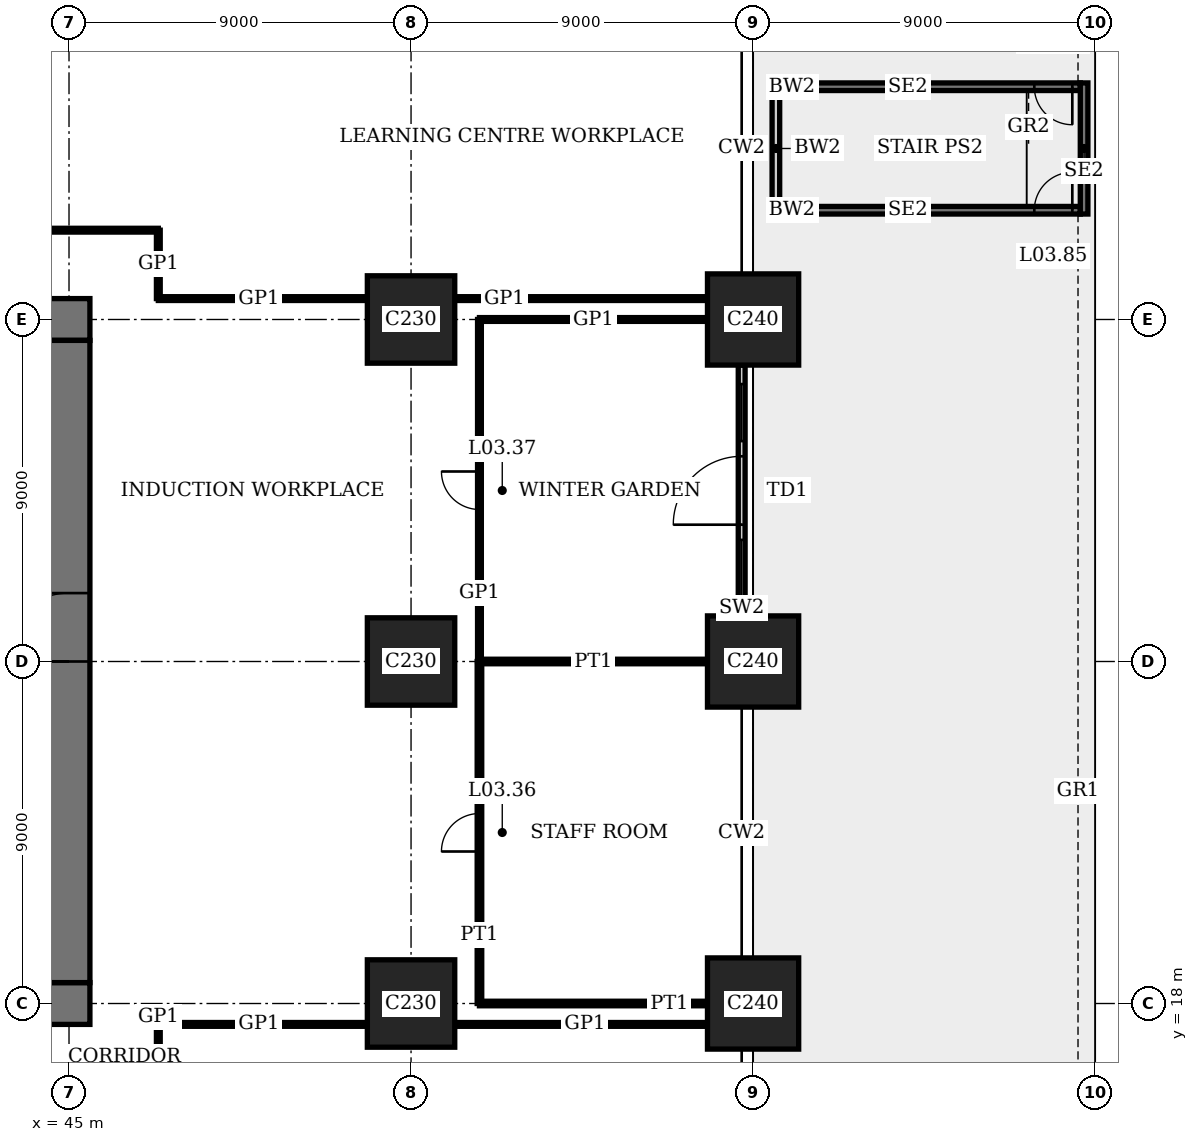
"""IFC4 building model, lengths in metres.
Left out: names, types, materials, properties, quantities, classifications, styles, units other than length and angle.
Written with IfcOpenShell. Run it as: python <this file> out.ifc"""

import sys

from ifc_helpers import new_model, si_unit, direction, frame, frame_2d, origin, origin_2d, place, context, subcontext, project, spatial, rectangle, extrude, element, fill, save


model = new_model("IFC4")
c1 = context("Model", 3, precision=1e-05, world=origin(), true_north=direction((0.0, 1.0)))
c2 = subcontext(c1, "Body", "Model", "MODEL_VIEW")
j1 = project(units=[si_unit("LENGTHUNIT", "METRE"), si_unit("PLANEANGLEUNIT", "RADIAN")], contexts=[c1])
p1 = place(None, origin())
s1 = spatial("IfcSite", under=j1, at=p1, CompositionType="ELEMENT")
p2 = place(p1, origin())
s2 = spatial("IfcBuilding", under=s1, at=p2, CompositionType="ELEMENT")
p3 = place(p2, frame((0.0, 0.0, 15.8)))
s3 = spatial("IfcBuildingStorey", under=s2, at=p3, CompositionType="ELEMENT", Elevation=15.8)
for number, where, z_axis, x_axis in (
    (1, (54.0, 18.0, 0.0), (0.0, 0.0, 1.0), (1.0, 0.0, 0.0)),
    (2, (54.0, 27.0, 0.0), (0.0, 0.0, 1.0), (1.0, 0.0, 0.0)),
    (3, (54.0, 36.0, 0.0), (0.0, 0.0, 1.0), (1.0, 0.0, 0.0)),
):
    element("IfcColumn", number, at=place(p3, frame(where, z_axis=z_axis, x_axis=x_axis)), inside=s3, PredefinedType="COLUMN", context=c2, shape_type="SweptSolid", body=[
        extrude(rectangle(XDim=2.3, YDim=2.3, at=origin_2d()), origin(), (0.0, 0.0, 1.0), 4.0),
    ])
for number, where, z_axis, x_axis in (
    (4, (63.0, 18.0, 0.0), (0.0, 0.0, 1.0), (1.0, 0.0, 0.0)),
    (5, (63.0, 27.0, 0.0), (0.0, 0.0, 1.0), (1.0, 0.0, 0.0)),
    (6, (63.0, 36.0, 0.0), (0.0, 0.0, 1.0), (1.0, 0.0, 0.0)),
):
    element("IfcColumn", number, at=place(p3, frame(where, z_axis=z_axis, x_axis=x_axis)), inside=s3, PredefinedType="COLUMN", context=c2, shape_type="SweptSolid", body=[
        extrude(rectangle(XDim=2.4, YDim=2.4, at=origin_2d()), origin(), (0.0, 0.0, 1.0), 4.0),
    ])
p4 = place(p3, frame((17.45, 18.0, 0.0), z_axis=(0.0, 0.0, 1.0), x_axis=(1.0, 0.0, 0.0)))
e7 = element("IfcWall", 7, at=p4, inside=s3, PredefinedType="SHEAR", context=c2, shape_type="SweptSolid", body=[
    extrude(rectangle(XDim=28.1, YDim=1.1, at=frame_2d((14.05, 0.0))), origin(), (0.0, 0.0, 1.0), 4.0),
])
p5 = place(p4, frame((11.55, 0.0, 0.0)))
e8 = element("IfcOpeningElement", 8, at=p5, cuts=e7, PredefinedType="OPENING", context=c2, shape_type="SweptSolid", body=[
    extrude(rectangle(XDim=1.0, YDim=2.4, at=frame_2d((0.5, 1.2))), frame((0.0, 0.56, 0.0), z_axis=(0.0, -1.0, 0.0), x_axis=(1.0, 0.0, 0.0)), (0.0, 0.0, 1.0), 1.12),
])
p6 = place(p4, frame((16.55, 0.0, 0.0)))
e9 = element("IfcOpeningElement", 9, at=p6, cuts=e7, PredefinedType="OPENING", context=c2, shape_type="SweptSolid", body=[
    extrude(rectangle(XDim=1.0, YDim=2.4, at=frame_2d((0.5, 1.2))), frame((0.0, 0.56, 0.0), z_axis=(0.0, -1.0, 0.0), x_axis=(1.0, 0.0, 0.0)), (0.0, 0.0, 1.0), 1.12),
])
p7 = place(p4, frame((20.0, 0.0, 0.0)))
e10 = element("IfcOpeningElement", 10, at=p7, cuts=e7, PredefinedType="OPENING", context=c2, shape_type="SweptSolid", body=[
    extrude(rectangle(XDim=1.1, YDim=2.4, at=frame_2d((0.55, 1.2))), frame((0.0, 0.56, 0.0), z_axis=(0.0, -1.0, 0.0), x_axis=(1.0, 0.0, 0.0)), (0.0, 0.0, 1.0), 1.12),
])
p8 = place(p4, frame((24.05, 0.0, 0.0)))
e11 = element("IfcOpeningElement", 11, at=p8, cuts=e7, PredefinedType="OPENING", context=c2, shape_type="SweptSolid", body=[
    extrude(rectangle(XDim=1.0, YDim=2.4, at=frame_2d((0.5, 1.2))), frame((0.0, 0.56, 0.0), z_axis=(0.0, -1.0, 0.0), x_axis=(1.0, 0.0, 0.0)), (0.0, 0.0, 1.0), 1.12),
])
p9 = place(p3, frame((45.55, 36.0, 0.0), z_axis=(0.0, 0.0, 1.0), x_axis=(-1.0, 0.0, 0.0)))
e12 = element("IfcWall", 12, at=p9, inside=s3, PredefinedType="SHEAR", context=c2, shape_type="SweptSolid", body=[
    extrude(rectangle(XDim=28.1, YDim=1.1, at=frame_2d((14.05, 0.0))), origin(), (0.0, 0.0, 1.0), 4.0),
])
p10 = place(p9, frame((11.55, 0.0, 0.0)))
e13 = element("IfcOpeningElement", 13, at=p10, cuts=e12, PredefinedType="OPENING", context=c2, shape_type="SweptSolid", body=[
    extrude(rectangle(XDim=1.0, YDim=2.4, at=frame_2d((0.5, 1.2))), frame((0.0, 0.56, 0.0), z_axis=(0.0, -1.0, 0.0), x_axis=(1.0, 0.0, 0.0)), (0.0, 0.0, 1.0), 1.12),
])
p11 = place(p9, frame((16.55, 0.0, 0.0)))
e14 = element("IfcOpeningElement", 14, at=p11, cuts=e12, PredefinedType="OPENING", context=c2, shape_type="SweptSolid", body=[
    extrude(rectangle(XDim=1.0, YDim=2.4, at=frame_2d((0.5, 1.2))), frame((0.0, 0.56, 0.0), z_axis=(0.0, -1.0, 0.0), x_axis=(1.0, 0.0, 0.0)), (0.0, 0.0, 1.0), 1.12),
])
p12 = place(p9, frame((20.0, 0.0, 0.0)))
e15 = element("IfcOpeningElement", 15, at=p12, cuts=e12, PredefinedType="OPENING", context=c2, shape_type="SweptSolid", body=[
    extrude(rectangle(XDim=1.1, YDim=2.4, at=frame_2d((0.55, 1.2))), frame((0.0, 0.56, 0.0), z_axis=(0.0, -1.0, 0.0), x_axis=(1.0, 0.0, 0.0)), (0.0, 0.0, 1.0), 1.12),
])
p13 = place(p9, frame((24.05, 0.0, 0.0)))
e16 = element("IfcOpeningElement", 16, at=p13, cuts=e12, PredefinedType="OPENING", context=c2, shape_type="SweptSolid", body=[
    extrude(rectangle(XDim=1.0, YDim=2.4, at=frame_2d((0.5, 1.2))), frame((0.0, 0.56, 0.0), z_axis=(0.0, -1.0, 0.0), x_axis=(1.0, 0.0, 0.0)), (0.0, 0.0, 1.0), 1.12),
])
p14 = place(p3, frame((45.0, 18.55, 0.0), z_axis=(0.0, 0.0, 1.0), x_axis=(0.0, 1.0, 0.0)))
e17 = element("IfcWall", 17, at=p14, inside=s3, PredefinedType="SHEAR", context=c2, shape_type="SweptSolid", body=[
    extrude(rectangle(XDim=16.9, YDim=1.1, at=frame_2d((8.45, 0.0))), origin(), (0.0, 0.0, 1.0), 4.0),
])
p15 = place(p14, frame((8.45, 0.0, 0.0)))
e18 = element("IfcOpeningElement", 18, at=p15, cuts=e17, PredefinedType="OPENING", context=c2, shape_type="SweptSolid", body=[
    extrude(rectangle(XDim=1.8, YDim=2.4, at=frame_2d((0.9, 1.2))), frame((0.0, 0.56, 0.0), z_axis=(0.0, -1.0, 0.0), x_axis=(1.0, 0.0, 0.0)), (0.0, 0.0, 1.0), 1.12),
])
p16 = place(p3, frame((62.7, 28.2, 0.0), z_axis=(0.0, 0.0, 1.0), x_axis=(0.0, 1.0, 0.0)))
e19 = element("IfcWall", 19, at=p16, inside=s3, PredefinedType="SOLIDWALL", context=c2, shape_type="SweptSolid", body=[
    extrude(rectangle(XDim=6.6, YDim=0.18, at=frame_2d((3.3, 0.0))), origin(), (0.0, 0.0, 1.0), 2.95),
])
p17 = place(p16, frame((2.4, 0.0, 0.0)))
e20 = element("IfcOpeningElement", 20, at=p17, cuts=e19, PredefinedType="OPENING", context=c2, shape_type="SweptSolid", body=[
    extrude(rectangle(XDim=1.8, YDim=2.7, at=frame_2d((0.9, 1.35))), frame((0.0, 0.1, 0.0), z_axis=(0.0, -1.0, 0.0), x_axis=(1.0, 0.0, 0.0)), (0.0, 0.0, 1.0), 0.2),
])
p18 = place(p16, frame((0.5, 0.0, 0.3)))
e21 = element("IfcOpeningElement", 21, at=p18, cuts=e19, PredefinedType="OPENING", context=c2, shape_type="SweptSolid", body=[
    extrude(rectangle(XDim=1.5, YDim=2.4, at=frame_2d((0.75, 1.2))), frame((0.0, 0.1, 0.0), z_axis=(0.0, -1.0, 0.0), x_axis=(1.0, 0.0, 0.0)), (0.0, 0.0, 1.0), 0.2),
])
p19 = place(p16, frame((4.6, 0.0, 0.3)))
e22 = element("IfcOpeningElement", 22, at=p19, cuts=e19, PredefinedType="OPENING", context=c2, shape_type="SweptSolid", body=[
    extrude(rectangle(XDim=1.5, YDim=2.4, at=frame_2d((0.75, 1.2))), frame((0.0, 0.1, 0.0), z_axis=(0.0, -1.0, 0.0), x_axis=(1.0, 0.0, 0.0)), (0.0, 0.0, 1.0), 0.2),
])
p20 = place(p3, frame((47.35, 17.45, 0.0), z_axis=(0.0, 0.0, 1.0), x_axis=(1.0, 0.0, 0.0)))
e23 = element("IfcWall", 23, at=p20, inside=s3, PredefinedType="PARTITIONING", context=c2, shape_type="SweptSolid", body=[
    extrude(rectangle(XDim=5.5, YDim=0.1, at=frame_2d((2.75, 0.0))), origin(), (0.0, 0.0, 1.0), 3.75),
])
p21 = place(p3, frame((55.15, 17.45, 0.0), z_axis=(0.0, 0.0, 1.0), x_axis=(1.0, 0.0, 0.0)))
e24 = element("IfcWall", 24, at=p21, inside=s3, PredefinedType="PARTITIONING", context=c2, shape_type="SweptSolid", body=[
    extrude(rectangle(XDim=6.65, YDim=0.1, at=frame_2d((3.325, 0.0))), origin(), (0.0, 0.0, 1.0), 3.75),
])
for number, where, z_axis, x_axis in (
    (25, (55.8, 18.0, 0.0), (0.0, 0.0, 1.0), (1.0, 0.0, 0.0)),
    (26, (55.8, 27.0, 0.0), (0.0, 0.0, 1.0), (1.0, 0.0, 0.0)),
):
    element("IfcWall", number, at=place(p3, frame(where, z_axis=z_axis, x_axis=x_axis)), inside=s3, PredefinedType="PARTITIONING", context=c2, shape_type="SweptSolid", body=[
        extrude(rectangle(XDim=6.0, YDim=0.12, at=frame_2d((3.0, 0.0))), origin(), (0.0, 0.0, 1.0), 3.05),
    ])
p22 = place(p3, frame((55.8, 36.0, 0.0), z_axis=(0.0, 0.0, 1.0), x_axis=(1.0, 0.0, 0.0)))
e27 = element("IfcWall", 27, at=p22, inside=s3, PredefinedType="PARTITIONING", context=c2, shape_type="SweptSolid", body=[
    extrude(rectangle(XDim=6.0, YDim=0.1, at=frame_2d((3.0, 0.0))), origin(), (0.0, 0.0, 1.0), 3.05),
])
p23 = place(p3, frame((47.35, 36.55, 0.0), z_axis=(0.0, 0.0, 1.0), x_axis=(1.0, 0.0, 0.0)))
e28 = element("IfcWall", 28, at=p23, inside=s3, PredefinedType="PARTITIONING", context=c2, shape_type="SweptSolid", body=[
    extrude(rectangle(XDim=5.5, YDim=0.1, at=frame_2d((2.75, 0.0))), origin(), (0.0, 0.0, 1.0), 3.75),
])
p24 = place(p3, frame((55.15, 36.55, 0.0), z_axis=(0.0, 0.0, 1.0), x_axis=(1.0, 0.0, 0.0)))
e29 = element("IfcWall", 29, at=p24, inside=s3, PredefinedType="PARTITIONING", context=c2, shape_type="SweptSolid", body=[
    extrude(rectangle(XDim=6.65, YDim=0.1, at=frame_2d((3.325, 0.0))), origin(), (0.0, 0.0, 1.0), 3.75),
])
p25 = place(p3, frame((36.0, 38.35, 0.0), z_axis=(0.0, 0.0, 1.0), x_axis=(1.0, 0.0, 0.0)))
e30 = element("IfcWall", 30, at=p25, inside=s3, PredefinedType="PARTITIONING", context=c2, shape_type="SweptSolid", body=[
    extrude(rectangle(XDim=11.35, YDim=0.1, at=frame_2d((5.675, 0.0))), origin(), (0.0, 0.0, 1.0), 3.75),
])
for number, where, z_axis, x_axis in (
    (31, (47.35, 15.65, 0.0), (0.0, 0.0, 1.0), (0.0, 1.0, 0.0)),
    (32, (47.35, 36.55, 0.0), (0.0, 0.0, 1.0), (0.0, 1.0, 0.0)),
):
    element("IfcWall", number, at=place(p3, frame(where, z_axis=z_axis, x_axis=x_axis)), inside=s3, PredefinedType="PARTITIONING", context=c2, shape_type="SweptSolid", body=[
        extrude(rectangle(XDim=1.8, YDim=0.1, at=frame_2d((0.9, 0.0))), origin(), (0.0, 0.0, 1.0), 3.75),
    ])
p26 = place(p3, frame((55.8, 18.0, 0.0), z_axis=(0.0, 0.0, 1.0), x_axis=(0.0, 1.0, 0.0)))
e33 = element("IfcWall", 33, at=p26, inside=s3, PredefinedType="PARTITIONING", context=c2, shape_type="SweptSolid", body=[
    extrude(rectangle(XDim=9.0, YDim=0.12, at=frame_2d((4.5, 0.0))), origin(), (0.0, 0.0, 1.0), 3.75),
])
p27 = place(p26, frame((4.0, 0.0, 0.0)))
e34 = element("IfcOpeningElement", 34, at=p27, cuts=e33, PredefinedType="OPENING", context=c2, shape_type="SweptSolid", body=[
    extrude(rectangle(XDim=1.0, YDim=2.4, at=frame_2d((0.5, 1.2))), frame((0.0, 0.07, 0.0), z_axis=(0.0, -1.0, 0.0), x_axis=(1.0, 0.0, 0.0)), (0.0, 0.0, 1.0), 0.14),
])
p28 = place(p3, frame((55.8, 27.0, 0.0), z_axis=(0.0, 0.0, 1.0), x_axis=(0.0, 1.0, 0.0)))
e35 = element("IfcWall", 35, at=p28, inside=s3, PredefinedType="PARTITIONING", context=c2, shape_type="SweptSolid", body=[
    extrude(rectangle(XDim=9.0, YDim=0.1, at=frame_2d((4.5, 0.0))), origin(), (0.0, 0.0, 1.0), 3.75),
])
p29 = place(p28, frame((4.0, 0.0, 0.0)))
e36 = element("IfcOpeningElement", 36, at=p29, cuts=e35, PredefinedType="OPENING", context=c2, shape_type="SweptSolid", body=[
    extrude(rectangle(XDim=1.0, YDim=2.4, at=frame_2d((0.5, 1.2))), frame((0.0, 0.06, 0.0), z_axis=(0.0, -1.0, 0.0), x_axis=(1.0, 0.0, 0.0)), (0.0, 0.0, 1.0), 0.12),
])
p30 = place(p3, frame((71.61, 42.125, 0.0), z_axis=(0.0, 0.0, 1.0), x_axis=(-1.0, 0.0, 0.0)))
e37 = element("IfcWall", 37, at=p30, inside=s3, PredefinedType="SOLIDWALL", context=c2, shape_type="SweptSolid", body=[
    extrude(rectangle(XDim=7.26, YDim=0.2, at=frame_2d((3.63, 0.0))), origin(), (0.0, 0.0, 1.0), 3.75),
])
p31 = place(p30, frame((0.21, 0.0, 0.0)))
e38 = element("IfcOpeningElement", 38, at=p31, cuts=e37, PredefinedType="OPENING", context=c2, shape_type="SweptSolid", body=[
    extrude(rectangle(XDim=1.0, YDim=2.4, at=frame_2d((0.5, 1.2))), frame((0.0, 0.11, 0.0), z_axis=(0.0, -1.0, 0.0), x_axis=(1.0, 0.0, 0.0)), (0.0, 0.0, 1.0), 0.22),
])
p32 = place(p3, frame((71.61, 38.875, 0.0), z_axis=(0.0, 0.0, 1.0), x_axis=(-1.0, 0.0, 0.0)))
e39 = element("IfcWall", 39, at=p32, inside=s3, PredefinedType="SOLIDWALL", context=c2, shape_type="SweptSolid", body=[
    extrude(rectangle(XDim=7.26, YDim=0.2, at=frame_2d((3.63, 0.0))), origin(), (0.0, 0.0, 1.0), 3.75),
])
p33 = place(p32, frame((0.21, 0.0, 0.0)))
e40 = element("IfcOpeningElement", 40, at=p33, cuts=e39, PredefinedType="OPENING", context=c2, shape_type="SweptSolid", body=[
    extrude(rectangle(XDim=1.0, YDim=2.4, at=frame_2d((0.5, 1.2))), frame((0.0, 0.11, 0.0), z_axis=(0.0, -1.0, 0.0), x_axis=(1.0, 0.0, 0.0)), (0.0, 0.0, 1.0), 0.22),
])
for number, where, z_axis, x_axis in (
    (41, (64.35, 42.125, 0.0), (0.0, 0.0, 1.0), (-1.0, 0.0, 0.0)),
    (42, (64.35, 38.875, 0.0), (0.0, 0.0, 1.0), (-1.0, 0.0, 0.0)),
):
    element("IfcWall", number, at=place(p3, frame(where, z_axis=z_axis, x_axis=x_axis)), inside=s3, PredefinedType="SOLIDWALL", context=c2, shape_type="SweptSolid", body=[
        extrude(rectangle(XDim=0.65, YDim=0.2, at=frame_2d((0.325, 0.0))), origin(), (0.0, 0.0, 1.0), 3.75),
    ])
for number, where, z_axis, x_axis in (
    (43, (63.6, 42.225, 0.0), (0.0, 0.0, 1.0), (0.0, -1.0, 0.0)),
    (44, (71.71, 42.225, 0.0), (0.0, 0.0, 1.0), (0.0, -1.0, 0.0)),
):
    element("IfcWall", number, at=place(p3, frame(where, z_axis=z_axis, x_axis=x_axis)), inside=s3, PredefinedType="SOLIDWALL", context=c2, shape_type="SweptSolid", body=[
        extrude(rectangle(XDim=3.45, YDim=0.2, at=frame_2d((1.725, 0.0))), origin(), (0.0, 0.0, 1.0), 3.75),
    ])
p34 = place(p17, origin())
e45 = element("IfcDoor", 45, at=p34, inside=s3, OperationType="DOUBLE_DOOR_SINGLE_SWING", PredefinedType="DOOR", context=c2, shape_type="SweptSolid", body=[
    extrude(rectangle(XDim=1.8, YDim=2.7, at=frame_2d((0.9, 1.35))), frame((0.0, 0.035, 0.0), z_axis=(0.0, -1.0, 0.0), x_axis=(1.0, 0.0, 0.0)), (0.0, 0.0, 1.0), 0.07),
])
fill(e20, e45)
p35 = place(p18, origin())
e46 = element("IfcWindow", 46, at=p35, inside=s3, PartitioningType="SINGLE_PANEL", PredefinedType="WINDOW", context=c2, shape_type="SweptSolid", body=[
    extrude(rectangle(XDim=1.5, YDim=2.4, at=frame_2d((0.75, 1.2))), frame((0.0, 0.03, 0.0), z_axis=(0.0, -1.0, 0.0), x_axis=(1.0, 0.0, 0.0)), (0.0, 0.0, 1.0), 0.06),
])
fill(e21, e46)
p36 = place(p19, origin())
e47 = element("IfcWindow", 47, at=p36, inside=s3, PartitioningType="SINGLE_PANEL", PredefinedType="WINDOW", context=c2, shape_type="SweptSolid", body=[
    extrude(rectangle(XDim=1.5, YDim=2.4, at=frame_2d((0.75, 1.2))), frame((0.0, 0.03, 0.0), z_axis=(0.0, -1.0, 0.0), x_axis=(1.0, 0.0, 0.0)), (0.0, 0.0, 1.0), 0.06),
])
fill(e22, e47)
p37 = place(p15, origin())
e48 = element("IfcDoor", 48, at=p37, inside=s3, OperationType="DOUBLE_DOOR_DOUBLE_SWING", PredefinedType="DOOR", context=c2, shape_type="SweptSolid", body=[
    extrude(rectangle(XDim=1.8, YDim=2.4, at=frame_2d((0.9, 1.2))), frame((0.0, 0.03, 0.0), z_axis=(0.0, -1.0, 0.0), x_axis=(1.0, 0.0, 0.0)), (0.0, 0.0, 1.0), 0.06),
    extrude(rectangle(XDim=0.04, YDim=2.4, at=frame_2d((0.02, 1.2))), frame((0.0, 0.55, 0.0), z_axis=(0.0, -1.0, 0.0), x_axis=(1.0, 0.0, 0.0)), (0.0, 0.0, 1.0), 1.1),
    extrude(rectangle(XDim=0.04, YDim=2.4, at=frame_2d((1.78, 1.2))), frame((0.0, 0.55, 0.0), z_axis=(0.0, -1.0, 0.0), x_axis=(1.0, 0.0, 0.0)), (0.0, 0.0, 1.0), 1.1),
    extrude(rectangle(XDim=1.8, YDim=0.04, at=frame_2d((0.9, 2.38))), frame((0.0, 0.55, 0.0), z_axis=(0.0, -1.0, 0.0), x_axis=(1.0, 0.0, 0.0)), (0.0, 0.0, 1.0), 1.1),
])
fill(e18, e48)
p38 = place(p27, origin())
e49 = element("IfcDoor", 49, at=p38, inside=s3, OperationType="SINGLE_SWING_RIGHT", PredefinedType="DOOR", context=c2, shape_type="SweptSolid", body=[
    extrude(rectangle(XDim=1.0, YDim=2.4, at=frame_2d((0.5, 1.2))), frame((0.0, 0.025, 0.0), z_axis=(0.0, -1.0, 0.0), x_axis=(1.0, 0.0, 0.0)), (0.0, 0.0, 1.0), 0.05),
])
fill(e34, e49)
p39 = place(p29, origin())
e50 = element("IfcDoor", 50, at=p39, inside=s3, OperationType="SINGLE_SWING_LEFT", PredefinedType="DOOR", context=c2, shape_type="SweptSolid", body=[
    extrude(rectangle(XDim=1.0, YDim=2.4, at=frame_2d((0.5, 1.2))), frame((0.0, 0.02, 0.0), z_axis=(0.0, -1.0, 0.0), x_axis=(1.0, 0.0, 0.0)), (0.0, 0.0, 1.0), 0.04),
])
fill(e36, e50)
p40 = place(p31, origin())
e51 = element("IfcDoor", 51, at=p40, inside=s3, OperationType="SINGLE_SWING_RIGHT", PredefinedType="DOOR", context=c2, shape_type="SweptSolid", body=[
    extrude(rectangle(XDim=1.0, YDim=2.4, at=frame_2d((0.5, 1.2))), frame((0.0, 0.03, 0.0), z_axis=(0.0, -1.0, 0.0), x_axis=(1.0, 0.0, 0.0)), (0.0, 0.0, 1.0), 0.06),
])
fill(e38, e51)
p41 = place(p33, origin())
e52 = element("IfcDoor", 52, at=p41, inside=s3, OperationType="SINGLE_SWING_LEFT", PredefinedType="DOOR", context=c2, shape_type="SweptSolid", body=[
    extrude(rectangle(XDim=1.0, YDim=2.4, at=frame_2d((0.5, 1.2))), frame((0.0, 0.03, 0.0), z_axis=(0.0, -1.0, 0.0), x_axis=(1.0, 0.0, 0.0)), (0.0, 0.0, 1.0), 0.06),
])
fill(e40, e52)
save(model, sys.argv[1])
